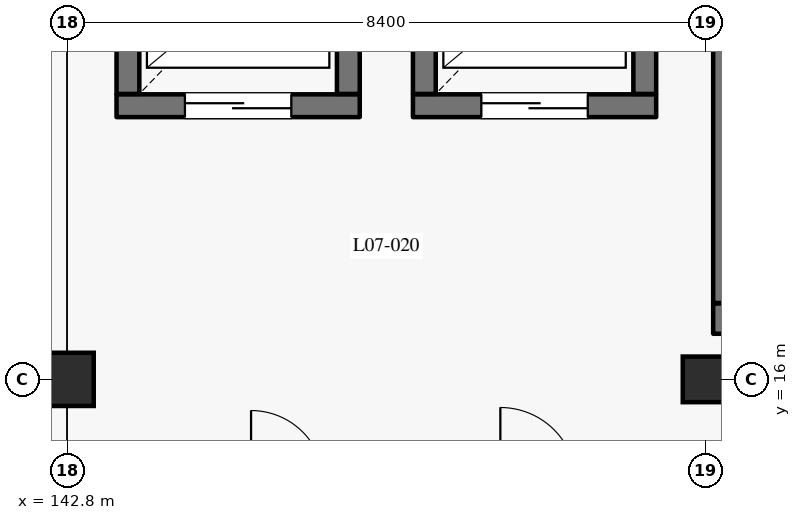
"""IFC4 building model, lengths in metres.
Left out: names, types, materials, properties, quantities, classifications, styles, units other than length and angle.
Written with IfcOpenShell. Run it as: python <this file> out.ifc"""

import sys

from ifc_helpers import new_model, si_unit, direction, frame, frame_2d, origin, origin_2d, place, context, subcontext, project, spatial, rectangle, extrude, element, fill, save


model = new_model("IFC4")
c1 = context("Model", 3, precision=1e-05, world=origin(), true_north=direction((0.0, 1.0)))
c2 = subcontext(c1, "Body", "Model", "MODEL_VIEW")
j1 = project(units=[si_unit("LENGTHUNIT", "METRE"), si_unit("PLANEANGLEUNIT", "RADIAN")], contexts=[c1])
p1 = place(None, origin())
s1 = spatial("IfcSite", under=j1, at=p1, CompositionType="ELEMENT")
p2 = place(p1, origin())
s2 = spatial("IfcBuilding", under=s1, at=p2, CompositionType="ELEMENT")
p3 = place(p2, frame((0.0, 0.0, 32.4)))
s3 = spatial("IfcBuildingStorey", under=s2, at=p3, CompositionType="ELEMENT", Elevation=32.4)
p4 = place(p3, frame((142.8, 16.0, 0.0), z_axis=(0.0, 0.0, 1.0), x_axis=(1.0, 0.0, 0.0)))
e1 = element("IfcColumn", 1, at=p4, inside=s3, PredefinedType="COLUMN", context=c2, shape_type="SweptSolid", body=[
    extrude(rectangle(XDim=0.7, YDim=0.7, at=origin_2d()), origin(), (0.0, 0.0, 1.0), 3.6),
])
p5 = place(p3, frame((151.2, 16.0, 0.0), z_axis=(0.0, 0.0, 1.0), x_axis=(1.0, 0.0, 0.0)))
e2 = element("IfcColumn", 2, at=p5, inside=s3, PredefinedType="COLUMN", context=c2, shape_type="SweptSolid", body=[
    extrude(rectangle(XDim=0.6, YDim=0.6, at=origin_2d()), origin(), (0.0, 0.0, 1.0), 3.6),
])
p6 = place(p3, frame((143.45, 19.6, 0.0), z_axis=(0.0, 0.0, 1.0), x_axis=(1.0, 0.0, 0.0)))
e3 = element("IfcWall", 3, at=p6, inside=s3, PredefinedType="SHEAR", context=c2, shape_type="SweptSolid", body=[
    extrude(rectangle(XDim=3.2, YDim=0.3, at=frame_2d((1.6, 0.0))), origin(), (0.0, 0.0, 1.0), 3.335),
])
p7 = place(p6, frame((0.9, 0.0, 0.0)))
e4 = element("IfcOpeningElement", 4, at=p7, cuts=e3, PredefinedType="OPENING", context=c2, shape_type="SweptSolid", body=[
    extrude(rectangle(XDim=1.4, YDim=2.35, at=frame_2d((0.7, 1.175))), frame((0.0, 0.16, 0.0), z_axis=(0.0, -1.0, 0.0), x_axis=(1.0, 0.0, 0.0)), (0.0, 0.0, 1.0), 0.32),
])
for number, where, z_axis, x_axis in (
    (5, (146.5, 19.755, 0.0), (0.0, 0.0, 1.0), (0.0, 1.0, 0.0)),
    (6, (143.6, 22.445, 0.0), (0.0, 0.0, 1.0), (0.0, -1.0, 0.0)),
):
    element("IfcWall", number, at=place(p3, frame(where, z_axis=z_axis, x_axis=x_axis)), inside=s3, PredefinedType="SHEAR", context=c2, shape_type="SweptSolid", body=[
        extrude(rectangle(XDim=2.69, YDim=0.3, at=frame_2d((1.345, 0.0))), origin(), (0.0, 0.0, 1.0), 3.335),
    ])
p8 = place(p3, frame((147.35, 19.6, 0.0), z_axis=(0.0, 0.0, 1.0), x_axis=(1.0, 0.0, 0.0)))
e7 = element("IfcWall", 7, at=p8, inside=s3, PredefinedType="SHEAR", context=c2, shape_type="SweptSolid", body=[
    extrude(rectangle(XDim=3.2, YDim=0.3, at=frame_2d((1.6, 0.0))), origin(), (0.0, 0.0, 1.0), 3.335),
])
p9 = place(p8, frame((0.9, 0.0, 0.0)))
e8 = element("IfcOpeningElement", 8, at=p9, cuts=e7, PredefinedType="OPENING", context=c2, shape_type="SweptSolid", body=[
    extrude(rectangle(XDim=1.4, YDim=2.35, at=frame_2d((0.7, 1.175))), frame((0.0, 0.16, 0.0), z_axis=(0.0, -1.0, 0.0), x_axis=(1.0, 0.0, 0.0)), (0.0, 0.0, 1.0), 0.32),
])
for number, where, z_axis, x_axis in (
    (9, (150.4, 19.755, 0.0), (0.0, 0.0, 1.0), (0.0, 1.0, 0.0)),
    (10, (147.5, 22.445, 0.0), (0.0, 0.0, 1.0), (0.0, -1.0, 0.0)),
):
    element("IfcWall", number, at=place(p3, frame(where, z_axis=z_axis, x_axis=x_axis)), inside=s3, PredefinedType="SHEAR", context=c2, shape_type="SweptSolid", body=[
        extrude(rectangle(XDim=2.69, YDim=0.3, at=frame_2d((1.345, 0.0))), origin(), (0.0, 0.0, 1.0), 3.335),
    ])
p10 = place(p3, frame((151.3, 16.8, 0.0), z_axis=(0.0, 0.0, 1.0), x_axis=(1.0, 0.0, 0.0)))
e11 = element("IfcWall", 11, at=p10, inside=s3, PredefinedType="SHEAR", context=c2, shape_type="SweptSolid", body=[
    extrude(rectangle(XDim=8.2, YDim=0.4, at=frame_2d((4.1, 0.0))), origin(), (0.0, 0.0, 1.0), 3.335),
])
p11 = place(p3, frame((151.5, 17.005, 0.0), z_axis=(0.0, 0.0, 1.0), x_axis=(0.0, 1.0, 0.0)))
e12 = element("IfcWall", 12, at=p11, inside=s3, PredefinedType="SHEAR", context=c2, shape_type="SweptSolid", body=[
    extrude(rectangle(XDim=3.95, YDim=0.4, at=frame_2d((1.975, 0.0))), origin(), (0.0, 0.0, 1.0), 3.335),
])
p12 = place(p7, origin())
e13 = element("IfcDoor", 13, at=p12, inside=s3, OperationType="DOUBLE_DOOR_SLIDING", PredefinedType="DOOR", context=c2, shape_type="SweptSolid", body=[
    extrude(rectangle(XDim=1.4, YDim=2.35, at=frame_2d((0.7, 1.175))), frame((0.0, 0.025, 0.0), z_axis=(0.0, -1.0, 0.0), x_axis=(1.0, 0.0, 0.0)), (0.0, 0.0, 1.0), 0.05),
])
fill(e4, e13)
p13 = place(p9, origin())
e14 = element("IfcDoor", 14, at=p13, inside=s3, OperationType="DOUBLE_DOOR_SLIDING", PredefinedType="DOOR", context=c2, shape_type="SweptSolid", body=[
    extrude(rectangle(XDim=1.4, YDim=2.35, at=frame_2d((0.7, 1.175))), frame((0.0, 0.025, 0.0), z_axis=(0.0, -1.0, 0.0), x_axis=(1.0, 0.0, 0.0)), (0.0, 0.0, 1.0), 0.05),
])
fill(e8, e14)
save(model, sys.argv[1])
